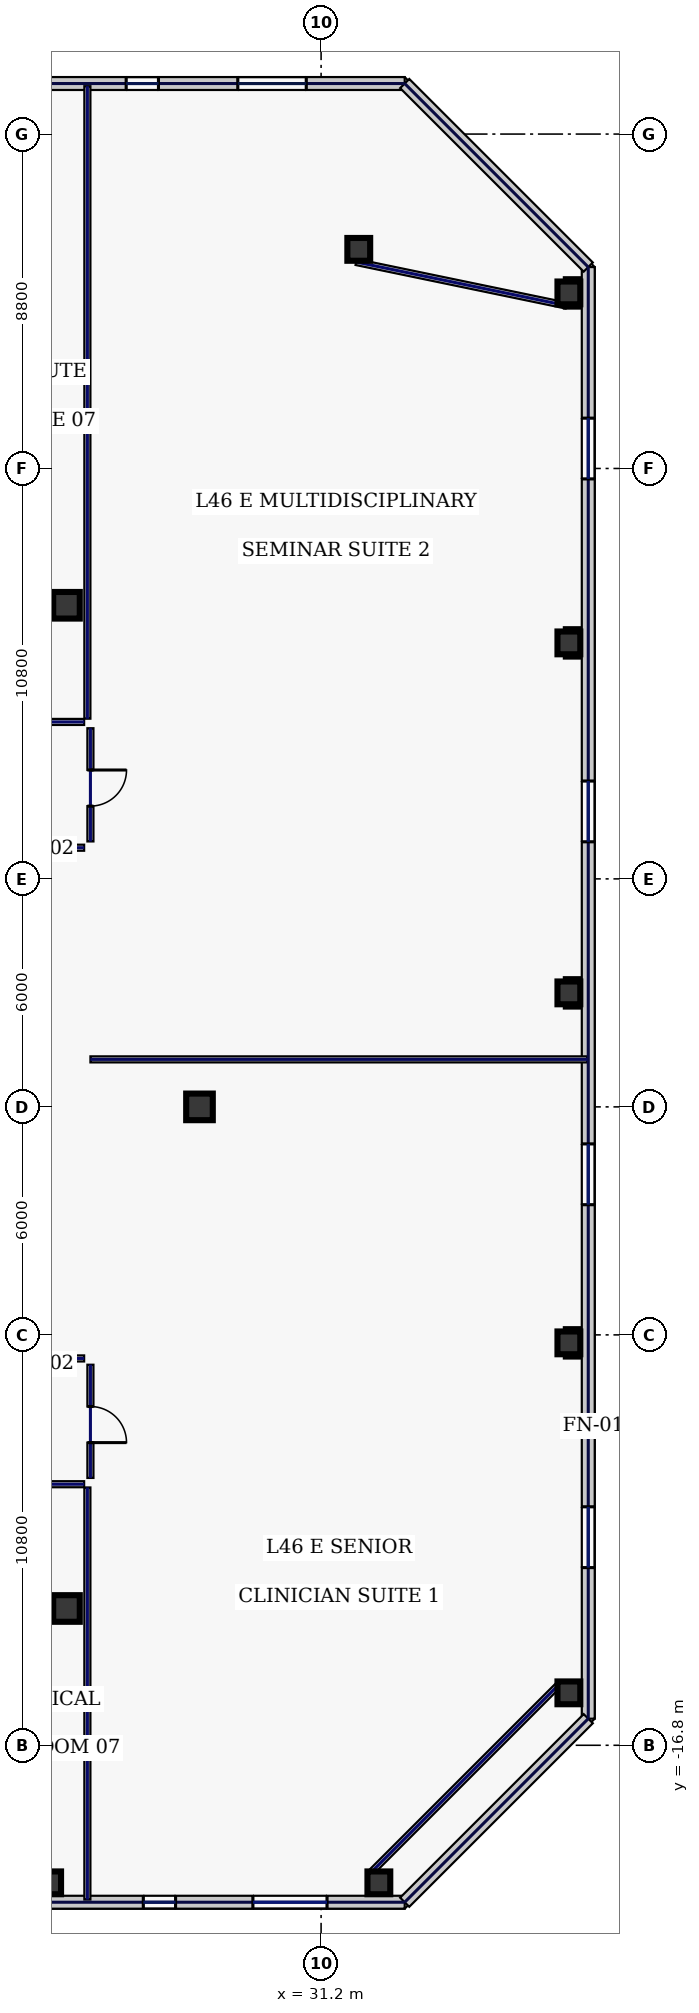
"""IFC4 building model, lengths in metres.
Left out: names, types, materials, properties, quantities, classifications, styles, units other than length and angle.
Written with IfcOpenShell. Run it as: python <this file> out.ifc"""

import sys

from ifc_helpers import new_model, si_unit, direction, frame, frame_2d, origin, origin_2d, place, context, subcontext, project, spatial, rectangle, hollow_rectangle, extrude, element, fill, save


model = new_model("IFC4")
c1 = context("Model", 3, precision=1e-05, world=origin(), true_north=direction((0.0, 1.0)))
c2 = subcontext(c1, "Body", "Model", "MODEL_VIEW")
j1 = project(units=[si_unit("LENGTHUNIT", "METRE"), si_unit("PLANEANGLEUNIT", "RADIAN")], contexts=[c1])
p1 = place(None, origin())
s1 = spatial("IfcSite", under=j1, at=p1, CompositionType="ELEMENT")
p2 = place(p1, origin())
s2 = spatial("IfcBuilding", under=s1, at=p2, CompositionType="ELEMENT")
p3 = place(p2, frame((0.0, 0.0, 200.2)))
s3 = spatial("IfcBuildingStorey", under=s2, at=p3, CompositionType="ELEMENT", Elevation=200.2)
for number, where, z_axis, x_axis in (
    (1, (24.5, -13.2, 0.0), (0.0, 0.0, 1.0), (1.0, 0.0, 0.0)),
    (2, (24.5, 13.2, 0.0), (0.0, 0.0, 1.0), (1.0, 0.0, 0.0)),
    (3, (28.0, 0.0, 0.0), (0.0, 0.0, 1.0), (1.0, 0.0, 0.0)),
):
    element("IfcColumn", number, at=place(p3, frame(where, z_axis=z_axis, x_axis=x_axis)), inside=s3, PredefinedType="COLUMN", context=c2, shape_type="SweptSolid", body=[
        extrude(hollow_rectangle(XDim=0.7, YDim=0.7, WallThickness=0.032, at=origin_2d()), origin(), (0.0, 0.0, 1.0), 3.74),
    ])
for number, where, z_axis, x_axis in (
    (4, (24.057, -20.42, 0.0), (0.0, 0.0, 1.0), (1.0, 0.0, 0.0)),
    (5, (32.72, -20.42, 0.0), (0.0, 0.0, 1.0), (1.0, 0.0, 0.0)),
    (6, (32.191, 22.566, 0.0), (0.0, 0.0, 1.0), (1.0, 0.0, 0.0)),
    (7, (37.72, -15.42, 0.0), (0.0, 0.0, 1.0), (1.0, 0.0, 0.0)),
    (8, (37.72, -6.21, 0.0), (0.0, 0.0, 1.0), (1.0, 0.0, 0.0)),
    (9, (37.72, 3.0, 0.0), (0.0, 0.0, 1.0), (1.0, 0.0, 0.0)),
    (10, (37.72, 12.21, 0.0), (0.0, 0.0, 1.0), (1.0, 0.0, 0.0)),
    (11, (37.72, 21.42, 0.0), (0.0, 0.0, 1.0), (1.0, 0.0, 0.0)),
):
    element("IfcColumn", number, at=place(p3, frame(where, z_axis=z_axis, x_axis=x_axis)), inside=s3, PredefinedType="COLUMN", context=c2, shape_type="SweptSolid", body=[
        extrude(hollow_rectangle(XDim=0.6, YDim=0.6, WallThickness=0.028, at=origin_2d()), origin(), (0.0, 0.0, 1.0), 3.74),
    ])
p4 = place(p3, frame((13.463, -20.93, 0.0), z_axis=(0.0, 0.0, 1.0), x_axis=(1.0, 0.0, 0.0)))
e12 = element("IfcWall", 12, at=p4, inside=s3, PredefinedType="STANDARD", context=c2, shape_type="SweptSolid", body=[
    extrude(rectangle(XDim=19.937, YDim=0.34, at=frame_2d((9.969, 0.0))), origin(), (0.0, 0.0, 1.0), 3.74),
])
p5 = place(p4, frame((3.295, 0.0, 0.8)))
e13 = element("IfcOpeningElement", 13, at=p5, cuts=e12, PredefinedType="OPENING", context=c2, shape_type="SweptSolid", body=[
    extrude(rectangle(XDim=1.95, YDim=2.1, at=frame_2d((0.975, 1.05))), frame((0.0, 0.18, 0.0), z_axis=(0.0, -1.0, 0.0), x_axis=(1.0, 0.0, 0.0)), (0.0, 0.0, 1.0), 0.36),
])
p6 = place(p4, frame((7.28, 0.0, 0.8)))
e14 = element("IfcOpeningElement", 14, at=p6, cuts=e12, PredefinedType="OPENING", context=c2, shape_type="SweptSolid", body=[
    extrude(rectangle(XDim=1.95, YDim=2.1, at=frame_2d((0.975, 1.05))), frame((0.0, 0.18, 0.0), z_axis=(0.0, -1.0, 0.0), x_axis=(1.0, 0.0, 0.0)), (0.0, 0.0, 1.0), 0.36),
])
p7 = place(p4, frame((13.058, 0.0, 0.8)))
e15 = element("IfcOpeningElement", 15, at=p7, cuts=e12, PredefinedType="OPENING", context=c2, shape_type="SweptSolid", body=[
    extrude(rectangle(XDim=0.85, YDim=1.85, at=frame_2d((0.425, 0.925))), frame((0.0, 0.18, 0.0), z_axis=(0.0, -1.0, 0.0), x_axis=(1.0, 0.0, 0.0)), (0.0, 0.0, 1.0), 0.36),
])
p8 = place(p4, frame((15.943, 0.0, 0.8)))
e16 = element("IfcOpeningElement", 16, at=p8, cuts=e12, PredefinedType="OPENING", context=c2, shape_type="SweptSolid", body=[
    extrude(rectangle(XDim=1.95, YDim=2.1, at=frame_2d((0.975, 1.05))), frame((0.0, 0.18, 0.0), z_axis=(0.0, -1.0, 0.0), x_axis=(1.0, 0.0, 0.0)), (0.0, 0.0, 1.0), 0.36),
])
p9 = place(p3, frame((33.4, 26.93, 0.0), z_axis=(0.0, 0.0, 1.0), x_axis=(-1.0, 0.0, 0.0)))
e17 = element("IfcWall", 17, at=p9, inside=s3, PredefinedType="STANDARD", context=c2, shape_type="SweptSolid", body=[
    extrude(rectangle(XDim=20.09, YDim=0.34, at=frame_2d((10.045, 0.0))), origin(), (0.0, 0.0, 1.0), 3.74),
])
p10 = place(p9, frame((15.005, 0.0, 0.7)))
e18 = element("IfcOpeningElement", 18, at=p10, cuts=e17, PredefinedType="OPENING", context=c2, shape_type="SweptSolid", body=[
    extrude(rectangle(XDim=1.8, YDim=2.2, at=frame_2d((0.9, 1.1))), frame((0.0, 0.18, 0.0), z_axis=(0.0, -1.0, 0.0), x_axis=(1.0, 0.0, 0.0)), (0.0, 0.0, 1.0), 0.36),
])
p11 = place(p9, frame((11.071, 0.0, 0.7)))
e19 = element("IfcOpeningElement", 19, at=p11, cuts=e17, PredefinedType="OPENING", context=c2, shape_type="SweptSolid", body=[
    extrude(rectangle(XDim=1.8, YDim=2.2, at=frame_2d((0.9, 1.1))), frame((0.0, 0.18, 0.0), z_axis=(0.0, -1.0, 0.0), x_axis=(1.0, 0.0, 0.0)), (0.0, 0.0, 1.0), 0.36),
])
p12 = place(p9, frame((6.48, 0.0, 0.7)))
e20 = element("IfcOpeningElement", 20, at=p12, cuts=e17, PredefinedType="OPENING", context=c2, shape_type="SweptSolid", body=[
    extrude(rectangle(XDim=0.85, YDim=1.85, at=frame_2d((0.425, 0.925))), frame((0.0, 0.18, 0.0), z_axis=(0.0, -1.0, 0.0), x_axis=(1.0, 0.0, 0.0)), (0.0, 0.0, 1.0), 0.36),
])
p13 = place(p9, frame((2.591, 0.0, 0.7)))
e21 = element("IfcOpeningElement", 21, at=p13, cuts=e17, PredefinedType="OPENING", context=c2, shape_type="SweptSolid", body=[
    extrude(rectangle(XDim=1.8, YDim=2.2, at=frame_2d((0.9, 1.1))), frame((0.0, 0.18, 0.0), z_axis=(0.0, -1.0, 0.0), x_axis=(1.0, 0.0, 0.0)), (0.0, 0.0, 1.0), 0.36),
])
p14 = place(p3, frame((38.23, -16.1, 0.0), z_axis=(0.0, 0.0, 1.0), x_axis=(0.0, 1.0, 0.0)))
e22 = element("IfcWall", 22, at=p14, inside=s3, PredefinedType="STANDARD", context=c2, shape_type="SweptSolid", body=[
    extrude(rectangle(XDim=38.2, YDim=0.34, at=frame_2d((19.1, 0.0))), origin(), (0.0, 0.0, 1.0), 3.74),
])
p15 = place(p14, frame((3.975, 0.0, 0.58)))
e23 = element("IfcOpeningElement", 23, at=p15, cuts=e22, PredefinedType="OPENING", context=c2, shape_type="SweptSolid", body=[
    extrude(rectangle(XDim=1.6, YDim=2.3, at=frame_2d((0.8, 1.15))), frame((0.0, 0.18, 0.0), z_axis=(0.0, -1.0, 0.0), x_axis=(1.0, 0.0, 0.0)), (0.0, 0.0, 1.0), 0.36),
])
p16 = place(p14, frame((13.525, 0.0, 0.58)))
e24 = element("IfcOpeningElement", 24, at=p16, cuts=e22, PredefinedType="OPENING", context=c2, shape_type="SweptSolid", body=[
    extrude(rectangle(XDim=1.6, YDim=2.3, at=frame_2d((0.8, 1.15))), frame((0.0, 0.18, 0.0), z_axis=(0.0, -1.0, 0.0), x_axis=(1.0, 0.0, 0.0)), (0.0, 0.0, 1.0), 0.36),
])
p17 = place(p14, frame((23.075, 0.0, 0.58)))
e25 = element("IfcOpeningElement", 25, at=p17, cuts=e22, PredefinedType="OPENING", context=c2, shape_type="SweptSolid", body=[
    extrude(rectangle(XDim=1.6, YDim=2.3, at=frame_2d((0.8, 1.15))), frame((0.0, 0.18, 0.0), z_axis=(0.0, -1.0, 0.0), x_axis=(1.0, 0.0, 0.0)), (0.0, 0.0, 1.0), 0.36),
])
p18 = place(p14, frame((32.625, 0.0, 0.58)))
e26 = element("IfcOpeningElement", 26, at=p18, cuts=e22, PredefinedType="OPENING", context=c2, shape_type="SweptSolid", body=[
    extrude(rectangle(XDim=1.6, YDim=2.3, at=frame_2d((0.8, 1.15))), frame((0.0, 0.18, 0.0), z_axis=(0.0, -1.0, 0.0), x_axis=(1.0, 0.0, 0.0)), (0.0, 0.0, 1.0), 0.36),
])
for number, where, z_axis, x_axis in (
    (27, (33.4, -20.93, 0.0), (0.0, 0.0, 1.0), (0.707, 0.707, 0.0)),
    (28, (38.23, 22.1, 0.0), (0.0, 0.0, 1.0), (-0.707, 0.707, 0.0)),
):
    element("IfcWall", number, at=place(p3, frame(where, z_axis=z_axis, x_axis=x_axis)), inside=s3, PredefinedType="STANDARD", context=c2, shape_type="SweptSolid", body=[
        extrude(rectangle(XDim=6.831, YDim=0.34, at=frame_2d((3.415, 0.0))), origin(), (0.0, 0.0, 1.0), 3.74),
    ])
p19 = place(p3, frame((32.479, -20.18, 0.0), z_axis=(0.0, 0.0, 1.0), x_axis=(0.707106781187, 0.707106781187, 0.0)))
e29 = element("IfcWall", 29, at=p19, inside=s3, PredefinedType="PARTITIONING", context=c2, shape_type="SweptSolid", body=[
    extrude(rectangle(XDim=7.071, YDim=0.16, at=frame_2d((3.536, 0.0))), origin(), (0.0, 0.0, 1.0), 3.74),
])
p20 = place(p3, frame((37.651, 21.087, 0.0), z_axis=(0.0, 0.0, 1.0), x_axis=(-0.979184618318, 0.202971631636, 0.0)))
e30 = element("IfcWall", 30, at=p20, inside=s3, PredefinedType="PARTITIONING", context=c2, shape_type="SweptSolid", body=[
    extrude(rectangle(XDim=5.646, YDim=0.16, at=frame_2d((2.823, 0.0))), origin(), (0.0, 0.0, 1.0), 3.74),
])
p21 = place(p3, frame((-24.965, 10.13, 0.0), z_axis=(0.0, 0.0, 1.0), x_axis=(1.0, 0.0, 0.0)))
e31 = element("IfcWall", 31, at=p21, inside=s3, PredefinedType="PARTITIONING", context=c2, shape_type="SweptSolid", body=[
    extrude(rectangle(XDim=49.93, YDim=0.16, at=frame_2d((24.965, 0.0))), origin(), (0.0, 0.0, 1.0), 3.74),
])
p22 = place(p21, frame((2.044, 0.0, 0.0)))
e32 = element("IfcOpeningElement", 32, at=p22, cuts=e31, PredefinedType="OPENING", context=c2, shape_type="SweptSolid", body=[
    extrude(rectangle(XDim=0.95, YDim=2.2, at=frame_2d((0.475, 1.1))), frame((0.0, 0.09, 0.0), z_axis=(0.0, -1.0, 0.0), x_axis=(1.0, 0.0, 0.0)), (0.0, 0.0, 1.0), 0.18),
])
p23 = place(p21, frame((7.775, 0.0, 0.0)))
e33 = element("IfcOpeningElement", 33, at=p23, cuts=e31, PredefinedType="OPENING", context=c2, shape_type="SweptSolid", body=[
    extrude(rectangle(XDim=0.95, YDim=2.2, at=frame_2d((0.475, 1.1))), frame((0.0, 0.09, 0.0), z_axis=(0.0, -1.0, 0.0), x_axis=(1.0, 0.0, 0.0)), (0.0, 0.0, 1.0), 0.18),
])
p24 = place(p21, frame((15.275, 0.0, 0.0)))
e34 = element("IfcOpeningElement", 34, at=p24, cuts=e31, PredefinedType="OPENING", context=c2, shape_type="SweptSolid", body=[
    extrude(rectangle(XDim=0.95, YDim=2.2, at=frame_2d((0.475, 1.1))), frame((0.0, 0.09, 0.0), z_axis=(0.0, -1.0, 0.0), x_axis=(1.0, 0.0, 0.0)), (0.0, 0.0, 1.0), 0.18),
])
p25 = place(p21, frame((21.475, 0.0, 0.0)))
e35 = element("IfcOpeningElement", 35, at=p25, cuts=e31, PredefinedType="OPENING", context=c2, shape_type="SweptSolid", body=[
    extrude(rectangle(XDim=1.3, YDim=2.2, at=frame_2d((0.65, 1.1))), frame((0.0, 0.09, 0.0), z_axis=(0.0, -1.0, 0.0), x_axis=(1.0, 0.0, 0.0)), (0.0, 0.0, 1.0), 0.18),
])
p26 = place(p21, frame((26.15, 0.0, 0.0)))
e36 = element("IfcOpeningElement", 36, at=p26, cuts=e31, PredefinedType="OPENING", context=c2, shape_type="SweptSolid", body=[
    extrude(rectangle(XDim=0.95, YDim=2.2, at=frame_2d((0.475, 1.1))), frame((0.0, 0.09, 0.0), z_axis=(0.0, -1.0, 0.0), x_axis=(1.0, 0.0, 0.0)), (0.0, 0.0, 1.0), 0.18),
])
p27 = place(p21, frame((32.575, 0.0, 0.0)))
e37 = element("IfcOpeningElement", 37, at=p27, cuts=e31, PredefinedType="OPENING", context=c2, shape_type="SweptSolid", body=[
    extrude(rectangle(XDim=0.95, YDim=2.2, at=frame_2d((0.475, 1.1))), frame((0.0, 0.09, 0.0), z_axis=(0.0, -1.0, 0.0), x_axis=(1.0, 0.0, 0.0)), (0.0, 0.0, 1.0), 0.18),
])
p28 = place(p21, frame((40.675, 0.0, 0.0)))
e38 = element("IfcOpeningElement", 38, at=p28, cuts=e31, PredefinedType="OPENING", context=c2, shape_type="SweptSolid", body=[
    extrude(rectangle(XDim=0.95, YDim=2.2, at=frame_2d((0.475, 1.1))), frame((0.0, 0.09, 0.0), z_axis=(0.0, -1.0, 0.0), x_axis=(1.0, 0.0, 0.0)), (0.0, 0.0, 1.0), 0.18),
])
p29 = place(p21, frame((46.631, 0.0, 0.0)))
e39 = element("IfcOpeningElement", 39, at=p29, cuts=e31, PredefinedType="OPENING", context=c2, shape_type="SweptSolid", body=[
    extrude(rectangle(XDim=1.3, YDim=2.2, at=frame_2d((0.65, 1.1))), frame((0.0, 0.09, 0.0), z_axis=(0.0, -1.0, 0.0), x_axis=(1.0, 0.0, 0.0)), (0.0, 0.0, 1.0), 0.18),
])
p30 = place(p3, frame((25.13, 9.965, 0.0), z_axis=(0.0, 0.0, 1.0), x_axis=(0.0, -1.0, 0.0)))
e40 = element("IfcWall", 40, at=p30, inside=s3, PredefinedType="PARTITIONING", context=c2, shape_type="SweptSolid", body=[
    extrude(rectangle(XDim=2.98, YDim=0.16, at=frame_2d((1.49, 0.0))), origin(), (0.0, 0.0, 1.0), 3.74),
])
p31 = place(p30, frame((1.1, 0.0, 0.0)))
e41 = element("IfcOpeningElement", 41, at=p31, cuts=e40, PredefinedType="OPENING", context=c2, shape_type="SweptSolid", body=[
    extrude(rectangle(XDim=0.95, YDim=2.2, at=frame_2d((0.475, 1.1))), frame((0.0, 0.09, 0.0), z_axis=(0.0, -1.0, 0.0), x_axis=(1.0, 0.0, 0.0)), (0.0, 0.0, 1.0), 0.18),
])
for number, where, z_axis, x_axis in (
    (42, (24.965, 6.82, 0.0), (0.0, 0.0, 1.0), (-1.0, 0.0, 0.0)),
    (43, (10.63, -6.62, 0.0), (0.0, 0.0, 1.0), (1.0, 0.0, 0.0)),
):
    element("IfcWall", number, at=place(p3, frame(where, z_axis=z_axis, x_axis=x_axis)), inside=s3, PredefinedType="PARTITIONING", context=c2, shape_type="SweptSolid", body=[
        extrude(rectangle(XDim=14.335, YDim=0.16, at=frame_2d((7.167, 0.0))), origin(), (0.0, 0.0, 1.0), 3.74),
    ])
p32 = place(p3, frame((25.13, -6.785, 0.0), z_axis=(0.0, 0.0, 1.0), x_axis=(0.0, -1.0, 0.0)))
e44 = element("IfcWall", 44, at=p32, inside=s3, PredefinedType="PARTITIONING", context=c2, shape_type="SweptSolid", body=[
    extrude(rectangle(XDim=2.98, YDim=0.16, at=frame_2d((1.49, 0.0))), origin(), (0.0, 0.0, 1.0), 3.74),
])
p33 = place(p32, frame((1.1, 0.0, 0.0)))
e45 = element("IfcOpeningElement", 45, at=p33, cuts=e44, PredefinedType="OPENING", context=c2, shape_type="SweptSolid", body=[
    extrude(rectangle(XDim=0.95, YDim=2.2, at=frame_2d((0.475, 1.1))), frame((0.0, 0.09, 0.0), z_axis=(0.0, -1.0, 0.0), x_axis=(1.0, 0.0, 0.0)), (0.0, 0.0, 1.0), 0.18),
])
p34 = place(p3, frame((24.965, -9.93, 0.0), z_axis=(0.0, 0.0, 1.0), x_axis=(-1.0, 0.0, 0.0)))
e46 = element("IfcWall", 46, at=p34, inside=s3, PredefinedType="PARTITIONING", context=c2, shape_type="SweptSolid", body=[
    extrude(rectangle(XDim=49.93, YDim=0.16, at=frame_2d((24.965, 0.0))), origin(), (0.0, 0.0, 1.0), 3.74),
])
p35 = place(p34, frame((47.106, 0.0, 0.0)))
e47 = element("IfcOpeningElement", 47, at=p35, cuts=e46, PredefinedType="OPENING", context=c2, shape_type="SweptSolid", body=[
    extrude(rectangle(XDim=0.95, YDim=2.2, at=frame_2d((0.475, 1.1))), frame((0.0, 0.09, 0.0), z_axis=(0.0, -1.0, 0.0), x_axis=(1.0, 0.0, 0.0)), (0.0, 0.0, 1.0), 0.18),
])
p36 = place(p34, frame((41.375, 0.0, 0.0)))
e48 = element("IfcOpeningElement", 48, at=p36, cuts=e46, PredefinedType="OPENING", context=c2, shape_type="SweptSolid", body=[
    extrude(rectangle(XDim=0.95, YDim=2.2, at=frame_2d((0.475, 1.1))), frame((0.0, 0.09, 0.0), z_axis=(0.0, -1.0, 0.0), x_axis=(1.0, 0.0, 0.0)), (0.0, 0.0, 1.0), 0.18),
])
p37 = place(p34, frame((33.875, 0.0, 0.0)))
e49 = element("IfcOpeningElement", 49, at=p37, cuts=e46, PredefinedType="OPENING", context=c2, shape_type="SweptSolid", body=[
    extrude(rectangle(XDim=0.95, YDim=2.2, at=frame_2d((0.475, 1.1))), frame((0.0, 0.09, 0.0), z_axis=(0.0, -1.0, 0.0), x_axis=(1.0, 0.0, 0.0)), (0.0, 0.0, 1.0), 0.18),
])
p38 = place(p34, frame((25.3, 0.0, 0.0)))
e50 = element("IfcOpeningElement", 50, at=p38, cuts=e46, PredefinedType="OPENING", context=c2, shape_type="SweptSolid", body=[
    extrude(rectangle(XDim=1.3, YDim=2.2, at=frame_2d((0.65, 1.1))), frame((0.0, 0.09, 0.0), z_axis=(0.0, -1.0, 0.0), x_axis=(1.0, 0.0, 0.0)), (0.0, 0.0, 1.0), 0.18),
])
p39 = place(p34, frame((16.4, 0.0, 0.0)))
e51 = element("IfcOpeningElement", 51, at=p39, cuts=e46, PredefinedType="OPENING", context=c2, shape_type="SweptSolid", body=[
    extrude(rectangle(XDim=1.3, YDim=2.2, at=frame_2d((0.65, 1.1))), frame((0.0, 0.09, 0.0), z_axis=(0.0, -1.0, 0.0), x_axis=(1.0, 0.0, 0.0)), (0.0, 0.0, 1.0), 0.18),
])
p40 = place(p34, frame((8.475, 0.0, 0.0)))
e52 = element("IfcOpeningElement", 52, at=p40, cuts=e46, PredefinedType="OPENING", context=c2, shape_type="SweptSolid", body=[
    extrude(rectangle(XDim=0.95, YDim=2.2, at=frame_2d((0.475, 1.1))), frame((0.0, 0.09, 0.0), z_axis=(0.0, -1.0, 0.0), x_axis=(1.0, 0.0, 0.0)), (0.0, 0.0, 1.0), 0.18),
])
p41 = place(p34, frame((2.344, 0.0, 0.0)))
e53 = element("IfcOpeningElement", 53, at=p41, cuts=e46, PredefinedType="OPENING", context=c2, shape_type="SweptSolid", body=[
    extrude(rectangle(XDim=0.95, YDim=2.2, at=frame_2d((0.475, 1.1))), frame((0.0, 0.09, 0.0), z_axis=(0.0, -1.0, 0.0), x_axis=(1.0, 0.0, 0.0)), (0.0, 0.0, 1.0), 0.18),
])
p42 = place(p3, frame((25.05, 10.215, 0.0), z_axis=(0.0, 0.0, 1.0), x_axis=(0.0, 1.0, 0.0)))
e54 = element("IfcWall", 54, at=p42, inside=s3, PredefinedType="PARTITIONING", context=c2, shape_type="SweptSolid", body=[
    extrude(rectangle(XDim=16.645, YDim=0.16, at=frame_2d((8.323, 0.0))), origin(), (0.0, 0.0, 1.0), 3.74),
])
p43 = place(p3, frame((25.05, -20.86, 0.0), z_axis=(0.0, 0.0, 1.0), x_axis=(0.0, 1.0, 0.0)))
e55 = element("IfcWall", 55, at=p43, inside=s3, PredefinedType="PARTITIONING", context=c2, shape_type="SweptSolid", body=[
    extrude(rectangle(XDim=10.845, YDim=0.16, at=frame_2d((5.423, 0.0))), origin(), (0.0, 0.0, 1.0), 3.74),
])
p44 = place(p3, frame((25.13, 1.25, 0.0), z_axis=(0.0, 0.0, 1.0), x_axis=(1.0, 0.0, 0.0)))
e56 = element("IfcWall", 56, at=p44, inside=s3, PredefinedType="PARTITIONING", context=c2, shape_type="SweptSolid", body=[
    extrude(rectangle(XDim=13.08, YDim=0.16, at=frame_2d((6.54, 0.0))), origin(), (0.0, 0.0, 1.0), 3.285),
])
p45 = place(p7, origin())
e57 = element("IfcWindow", 57, at=p45, inside=s3, PartitioningType="SINGLE_PANEL", PredefinedType="WINDOW", context=c2, shape_type="SweptSolid", body=[
    extrude(rectangle(XDim=0.85, YDim=1.85, at=frame_2d((0.425, 0.925))), frame((0.0, 0.03, 0.0), z_axis=(0.0, -1.0, 0.0), x_axis=(1.0, 0.0, 0.0)), (0.0, 0.0, 1.0), 0.06),
])
fill(e15, e57)
p46 = place(p8, origin())
e58 = element("IfcWindow", 58, at=p46, inside=s3, PartitioningType="SINGLE_PANEL", PredefinedType="WINDOW", context=c2, shape_type="SweptSolid", body=[
    extrude(rectangle(XDim=1.95, YDim=2.1, at=frame_2d((0.975, 1.05))), frame((0.0, 0.03, 0.0), z_axis=(0.0, -1.0, 0.0), x_axis=(1.0, 0.0, 0.0)), (0.0, 0.0, 1.0), 0.06),
])
fill(e16, e58)
p47 = place(p12, origin())
e59 = element("IfcWindow", 59, at=p47, inside=s3, PartitioningType="SINGLE_PANEL", PredefinedType="WINDOW", context=c2, shape_type="SweptSolid", body=[
    extrude(rectangle(XDim=0.85, YDim=1.85, at=frame_2d((0.425, 0.925))), frame((0.0, 0.03, 0.0), z_axis=(0.0, -1.0, 0.0), x_axis=(1.0, 0.0, 0.0)), (0.0, 0.0, 1.0), 0.06),
])
fill(e20, e59)
p48 = place(p13, origin())
e60 = element("IfcWindow", 60, at=p48, inside=s3, PartitioningType="SINGLE_PANEL", PredefinedType="WINDOW", context=c2, shape_type="SweptSolid", body=[
    extrude(rectangle(XDim=1.8, YDim=2.2, at=frame_2d((0.9, 1.1))), frame((0.0, 0.03, 0.0), z_axis=(0.0, -1.0, 0.0), x_axis=(1.0, 0.0, 0.0)), (0.0, 0.0, 1.0), 0.06),
])
fill(e21, e60)
p49 = place(p15, origin())
e61 = element("IfcWindow", 61, at=p49, inside=s3, PartitioningType="SINGLE_PANEL", PredefinedType="WINDOW", context=c2, shape_type="SweptSolid", body=[
    extrude(rectangle(XDim=1.6, YDim=2.3, at=frame_2d((0.8, 1.15))), frame((0.0, 0.03, 0.0), z_axis=(0.0, -1.0, 0.0), x_axis=(1.0, 0.0, 0.0)), (0.0, 0.0, 1.0), 0.06),
])
fill(e23, e61)
p50 = place(p16, origin())
e62 = element("IfcWindow", 62, at=p50, inside=s3, PartitioningType="SINGLE_PANEL", PredefinedType="WINDOW", context=c2, shape_type="SweptSolid", body=[
    extrude(rectangle(XDim=1.6, YDim=2.3, at=frame_2d((0.8, 1.15))), frame((0.0, 0.03, 0.0), z_axis=(0.0, -1.0, 0.0), x_axis=(1.0, 0.0, 0.0)), (0.0, 0.0, 1.0), 0.06),
])
fill(e24, e62)
p51 = place(p17, origin())
e63 = element("IfcWindow", 63, at=p51, inside=s3, PartitioningType="SINGLE_PANEL", PredefinedType="WINDOW", context=c2, shape_type="SweptSolid", body=[
    extrude(rectangle(XDim=1.6, YDim=2.3, at=frame_2d((0.8, 1.15))), frame((0.0, 0.03, 0.0), z_axis=(0.0, -1.0, 0.0), x_axis=(1.0, 0.0, 0.0)), (0.0, 0.0, 1.0), 0.06),
])
fill(e25, e63)
p52 = place(p18, origin())
e64 = element("IfcWindow", 64, at=p52, inside=s3, PartitioningType="SINGLE_PANEL", PredefinedType="WINDOW", context=c2, shape_type="SweptSolid", body=[
    extrude(rectangle(XDim=1.6, YDim=2.3, at=frame_2d((0.8, 1.15))), frame((0.0, 0.03, 0.0), z_axis=(0.0, -1.0, 0.0), x_axis=(1.0, 0.0, 0.0)), (0.0, 0.0, 1.0), 0.06),
])
fill(e26, e64)
p53 = place(p33, origin())
e65 = element("IfcDoor", 65, at=p53, inside=s3, OperationType="SINGLE_SWING_RIGHT", PredefinedType="DOOR", context=c2, shape_type="SweptSolid", body=[
    extrude(rectangle(XDim=0.95, YDim=2.2, at=frame_2d((0.475, 1.1))), frame((0.0, 0.025, 0.0), z_axis=(0.0, -1.0, 0.0), x_axis=(1.0, 0.0, 0.0)), (0.0, 0.0, 1.0), 0.05),
])
fill(e45, e65)
p54 = place(p31, origin())
e66 = element("IfcDoor", 66, at=p54, inside=s3, OperationType="SINGLE_SWING_LEFT", PredefinedType="DOOR", context=c2, shape_type="SweptSolid", body=[
    extrude(rectangle(XDim=0.95, YDim=2.2, at=frame_2d((0.475, 1.1))), frame((0.0, 0.025, 0.0), z_axis=(0.0, -1.0, 0.0), x_axis=(1.0, 0.0, 0.0)), (0.0, 0.0, 1.0), 0.05),
])
fill(e41, e66)
save(model, sys.argv[1])
